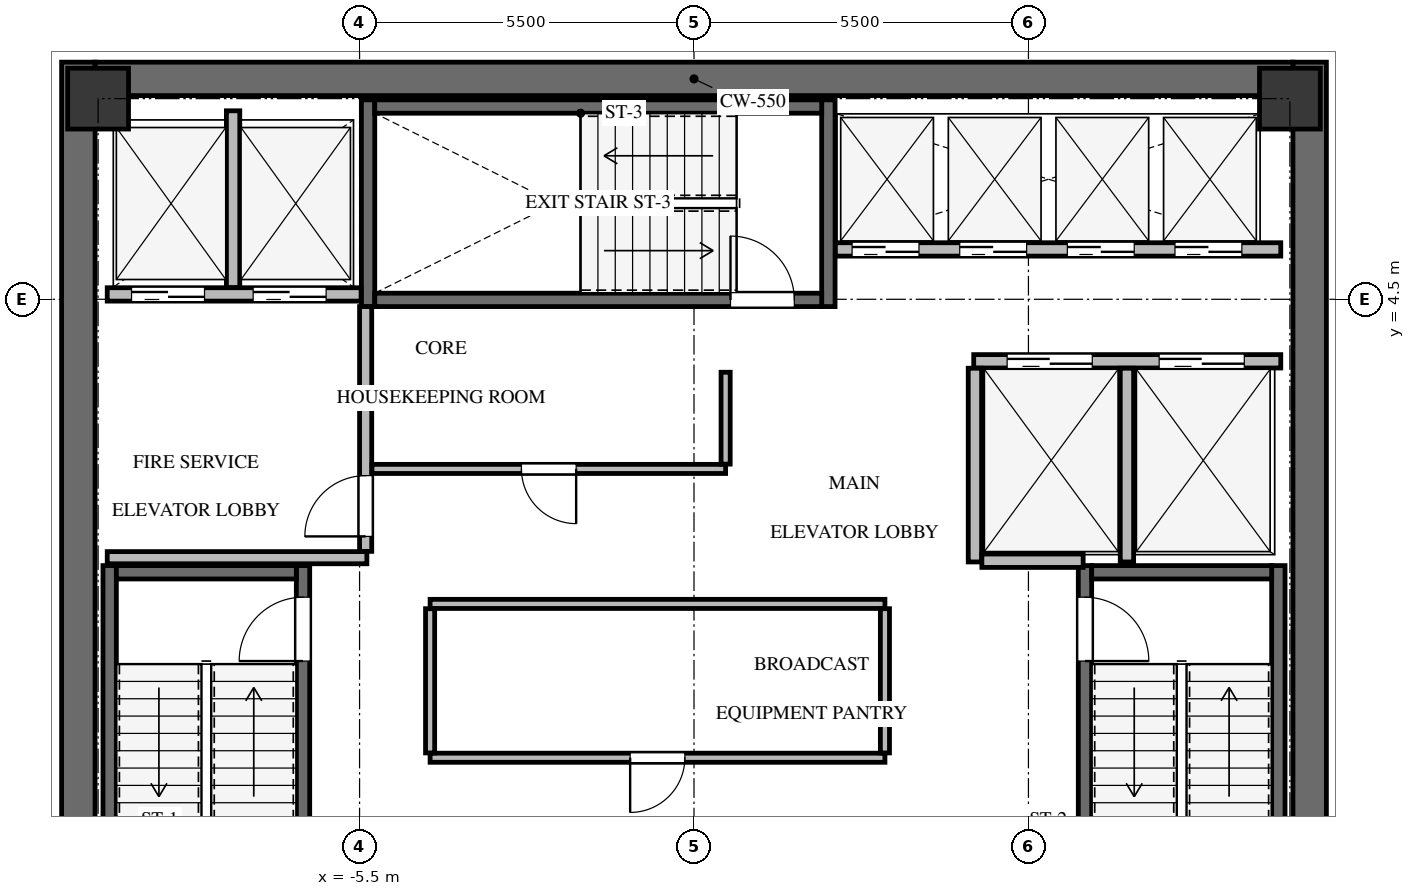
"""IFC4 building model, lengths in metres.
Left out: names, types, materials, properties, quantities, classifications, styles, units other than length and angle.
Written with IfcOpenShell. Run it as: python <this file> out.ifc"""

import sys

from ifc_helpers import new_model, si_unit, direction, frame, frame_2d, origin, origin_2d, place, context, subcontext, project, spatial, rectangle, extrude, source, transform, mapped, element, fill, save


model = new_model("IFC4")
c1 = context("Model", 3, precision=1e-05, world=origin(), true_north=direction((0.0, 1.0)))
c2 = subcontext(c1, "Body", "Model", "MODEL_VIEW")
j1 = project(units=[si_unit("LENGTHUNIT", "METRE"), si_unit("PLANEANGLEUNIT", "RADIAN")], contexts=[c1])
p1 = place(None, origin())
s1 = spatial("IfcSite", under=j1, at=p1, CompositionType="ELEMENT")
p2 = place(p1, origin())
s2 = spatial("IfcBuilding", under=s1, at=p2, CompositionType="ELEMENT")
p3 = place(p2, frame((0.0, 0.0, 251.3)))
s3 = spatial("IfcBuildingStorey", under=s2, at=p3, CompositionType="ELEMENT", Elevation=251.3)
for number, where, z_axis, x_axis in (
    (1, (-10.125, -8.4, 0.0), (0.0, 0.0, 1.0), (0.0, 1.0, 0.0)),
    (2, (10.125, -8.4, 0.0), (0.0, 0.0, 1.0), (0.0, 1.0, 0.0)),
):
    element("IfcWall", number, at=place(p3, frame(where, z_axis=z_axis, x_axis=x_axis)), inside=s3, PredefinedType="SHEAR", context=c2, shape_type="SweptSolid", body=[
        extrude(rectangle(XDim=16.8, YDim=0.55, at=frame_2d((8.4, 0.0))), origin(), (0.0, 0.0, 1.0), 3.4),
    ])
p4 = place(p3, frame((-9.85, 8.125, 0.0), z_axis=(0.0, 0.0, 1.0), x_axis=(1.0, 0.0, 0.0)))
e3 = element("IfcWall", 3, at=p4, inside=s3, PredefinedType="SHEAR", context=c2, shape_type="SweptSolid", body=[
    extrude(rectangle(XDim=19.7, YDim=0.55, at=frame_2d((9.85, 0.0))), origin(), (0.0, 0.0, 1.0), 3.4),
])
p5 = place(p3, frame((-6.43, -7.77, -0.24), z_axis=(0.0, 0.0, 1.0), x_axis=(0.0, 1.0, 0.0)))
e4 = element("IfcWall", 4, at=p5, inside=s3, PredefinedType="SHEAR", context=c2, shape_type="SweptSolid", body=[
    extrude(rectangle(XDim=7.89, YDim=0.22, at=frame_2d((3.945, 0.0))), origin(), (0.0, 0.0, 1.0), 3.4),
])
p6 = place(p5, frame((6.32, 0.0, 0.0)))
e5 = element("IfcOpeningElement", 5, at=p6, cuts=e4, PredefinedType="OPENING", context=c2, shape_type="SweptSolid", body=[
    extrude(rectangle(XDim=1.05, YDim=2.15, at=frame_2d((0.525, 1.075))), frame((0.0, 0.12, 0.0), z_axis=(0.0, -1.0, 0.0), x_axis=(1.0, 0.0, 0.0)), (0.0, 0.0, 1.0), 0.24),
])
p7 = place(p3, frame((-9.61, 0.12, -0.24), z_axis=(0.0, 0.0, 1.0), x_axis=(0.0, -1.0, 0.0)))
e6 = element("IfcWall", 6, at=p7, inside=s3, PredefinedType="SHEAR", context=c2, shape_type="SweptSolid", body=[
    extrude(rectangle(XDim=7.89, YDim=0.22, at=frame_2d((3.945, 0.0))), origin(), (0.0, 0.0, 1.0), 3.4),
])
p8 = place(p3, frame((-6.54, 0.01, -0.24), z_axis=(0.0, 0.0, 1.0), x_axis=(-1.0, 0.0, 0.0)))
e7 = element("IfcWall", 7, at=p8, inside=s3, PredefinedType="SHEAR", context=c2, shape_type="SweptSolid", body=[
    extrude(rectangle(XDim=2.96, YDim=0.22, at=frame_2d((1.48, 0.0))), origin(), (0.0, 0.0, 1.0), 3.4),
])
p9 = place(p3, frame((9.61, -7.77, -0.24), z_axis=(0.0, 0.0, 1.0), x_axis=(0.0, 1.0, 0.0)))
e8 = element("IfcWall", 8, at=p9, inside=s3, PredefinedType="SHEAR", context=c2, shape_type="SweptSolid", body=[
    extrude(rectangle(XDim=7.89, YDim=0.22, at=frame_2d((3.945, 0.0))), origin(), (0.0, 0.0, 1.0), 3.4),
])
p10 = place(p3, frame((6.43, 0.12, -0.24), z_axis=(0.0, 0.0, 1.0), x_axis=(0.0, -1.0, 0.0)))
e9 = element("IfcWall", 9, at=p10, inside=s3, PredefinedType="SHEAR", context=c2, shape_type="SweptSolid", body=[
    extrude(rectangle(XDim=7.89, YDim=0.22, at=frame_2d((3.945, 0.0))), origin(), (0.0, 0.0, 1.0), 3.4),
])
p11 = place(p10, frame((0.52, 0.0, 0.0)))
e10 = element("IfcOpeningElement", 10, at=p11, cuts=e9, PredefinedType="OPENING", context=c2, shape_type="SweptSolid", body=[
    extrude(rectangle(XDim=1.05, YDim=2.15, at=frame_2d((0.525, 1.075))), frame((0.0, 0.12, 0.0), z_axis=(0.0, -1.0, 0.0), x_axis=(1.0, 0.0, 0.0)), (0.0, 0.0, 1.0), 0.24),
])
p12 = place(p3, frame((9.5, 0.01, -0.24), z_axis=(0.0, 0.0, 1.0), x_axis=(-1.0, 0.0, 0.0)))
e11 = element("IfcWall", 11, at=p12, inside=s3, PredefinedType="SHEAR", context=c2, shape_type="SweptSolid", body=[
    extrude(rectangle(XDim=2.96, YDim=0.22, at=frame_2d((1.48, 0.0))), origin(), (0.0, 0.0, 1.0), 3.4),
])
for number, where, z_axis, x_axis in (
    (12, (2.21, 4.38, -0.24), (0.0, 0.0, 1.0), (0.0, 1.0, 0.0)),
    (13, (-5.36, 7.78, -0.24), (0.0, 0.0, 1.0), (0.0, -1.0, 0.0)),
):
    element("IfcWall", number, at=place(p3, frame(where, z_axis=z_axis, x_axis=x_axis)), inside=s3, PredefinedType="SHEAR", context=c2, shape_type="SweptSolid", body=[
        extrude(rectangle(XDim=3.4, YDim=0.22, at=frame_2d((1.7, 0.0))), origin(), (0.0, 0.0, 1.0), 3.4),
    ])
p13 = place(p3, frame((-5.25, 4.49, -0.24), z_axis=(0.0, 0.0, 1.0), x_axis=(1.0, 0.0, 0.0)))
e14 = element("IfcWall", 14, at=p13, inside=s3, PredefinedType="SHEAR", context=c2, shape_type="SweptSolid", body=[
    extrude(rectangle(XDim=7.35, YDim=0.22, at=frame_2d((3.675, 0.0))), origin(), (0.0, 0.0, 1.0), 3.4),
])
p14 = place(p13, frame((5.85, 0.0, 0.0)))
e15 = element("IfcOpeningElement", 15, at=p14, cuts=e14, PredefinedType="OPENING", context=c2, shape_type="SweptSolid", body=[
    extrude(rectangle(XDim=1.05, YDim=2.15, at=frame_2d((0.525, 1.075))), frame((0.0, 0.12, 0.0), z_axis=(0.0, -1.0, 0.0), x_axis=(1.0, 0.0, 0.0)), (0.0, 0.0, 1.0), 0.24),
])
p15 = place(p3, frame((2.1, 7.67, -0.24), z_axis=(0.0, 0.0, 1.0), x_axis=(-1.0, 0.0, 0.0)))
e16 = element("IfcWall", 16, at=p15, inside=s3, PredefinedType="SHEAR", context=c2, shape_type="SweptSolid", body=[
    extrude(rectangle(XDim=7.35, YDim=0.22, at=frame_2d((3.675, 0.0))), origin(), (0.0, 0.0, 1.0), 3.4),
])
m1 = source(origin(), c2, "Body", "SweptSolid", [
    extrude(rectangle(XDim=1.0, YDim=1.0, at=origin_2d()), origin(), (0.0, 0.0, 1.0), 3.4),
])
for number, where, z_axis, x_axis in (
    (17, (9.8, 7.8, -0.24), (0.0, 0.0, 1.0), (1.0, 0.0, 0.0)),
    (18, (-9.8, 7.8, -0.24), (0.0, 0.0, 1.0), (1.0, 0.0, 0.0)),
):
    element("IfcColumn", number, at=place(p3, frame(where, z_axis=z_axis, x_axis=x_axis)), inside=s3, PredefinedType="COLUMN", context=c2, shape_type="MappedRepresentation", body=[
        mapped(m1, transform((0.0, 0.0, 0.0), x_axis=(1.0, 0.0, 0.0), y_axis=(0.0, 1.0, 0.0), z_axis=(0.0, 0.0, 1.0), scale=1.0)),
    ])
p16 = place(p3, frame((-9.65, 4.58, 0.0), z_axis=(0.0, 0.0, 1.0), x_axis=(1.0, 0.0, 0.0)))
e19 = element("IfcWall", 19, at=p16, inside=s3, PredefinedType="SOLIDWALL", context=c2, shape_type="SweptSolid", body=[
    extrude(rectangle(XDim=4.175, YDim=0.22, at=frame_2d((2.087, 0.0))), origin(), (0.0, 0.0, 1.0), 3.145),
])
p17 = place(p16, frame((0.4, 0.0, 0.0)))
e20 = element("IfcOpeningElement", 20, at=p17, cuts=e19, PredefinedType="OPENING", context=c2, shape_type="SweptSolid", body=[
    extrude(rectangle(XDim=1.2, YDim=2.15, at=frame_2d((0.6, 1.075))), frame((0.0, 0.12, 0.0), z_axis=(0.0, -1.0, 0.0), x_axis=(1.0, 0.0, 0.0)), (0.0, 0.0, 1.0), 0.24),
])
p18 = place(p16, frame((2.4, 0.0, 0.0)))
e21 = element("IfcOpeningElement", 21, at=p18, cuts=e19, PredefinedType="OPENING", context=c2, shape_type="SweptSolid", body=[
    extrude(rectangle(XDim=1.2, YDim=2.15, at=frame_2d((0.6, 1.075))), frame((0.0, 0.12, 0.0), z_axis=(0.0, -1.0, 0.0), x_axis=(1.0, 0.0, 0.0)), (0.0, 0.0, 1.0), 0.24),
])
p19 = place(p3, frame((-7.58, 4.694, 0.0), z_axis=(0.0, 0.0, 1.0), x_axis=(0.0, 1.0, 0.0)))
e22 = element("IfcWall", 22, at=p19, inside=s3, PredefinedType="SOLIDWALL", context=c2, shape_type="SweptSolid", body=[
    extrude(rectangle(XDim=2.906, YDim=0.22, at=frame_2d((1.453, 0.0))), origin(), (0.0, 0.0, 1.0), 3.145),
])
p20 = place(p3, frame((-9.65, 0.25, 0.0), z_axis=(0.0, 0.0, 1.0), x_axis=(1.0, 0.0, 0.0)))
e23 = element("IfcWall", 23, at=p20, inside=s3, PredefinedType="SOLIDWALL", context=c2, shape_type="SweptSolid", body=[
    extrude(rectangle(XDim=4.27, YDim=0.2, at=frame_2d((2.135, 0.0))), origin(), (0.0, 0.0, 1.0), 3.145),
])
p21 = place(p3, frame((-5.4, 0.354, 0.0), z_axis=(0.0, 0.0, 1.0), x_axis=(0.0, 1.0, 0.0)))
e24 = element("IfcWall", 24, at=p21, inside=s3, PredefinedType="SOLIDWALL", context=c2, shape_type="SweptSolid", body=[
    extrude(rectangle(XDim=4.026, YDim=0.2, at=frame_2d((2.013, 0.0))), origin(), (0.0, 0.0, 1.0), 3.145),
])
p22 = place(p21, frame((0.246, 0.0, 0.0)))
e25 = element("IfcOpeningElement", 25, at=p22, cuts=e24, PredefinedType="OPENING", context=c2, shape_type="SweptSolid", body=[
    extrude(rectangle(XDim=1.0, YDim=2.15, at=frame_2d((0.5, 1.075))), frame((0.0, 0.11, 0.0), z_axis=(0.0, -1.0, 0.0), x_axis=(1.0, 0.0, 0.0)), (0.0, 0.0, 1.0), 0.22),
])
p23 = place(p3, frame((4.6, 3.48, 0.0), z_axis=(0.0, 0.0, 1.0), x_axis=(1.0, 0.0, 0.0)))
e26 = element("IfcWall", 26, at=p23, inside=s3, PredefinedType="SOLIDWALL", context=c2, shape_type="SweptSolid", body=[
    extrude(rectangle(XDim=5.05, YDim=0.22, at=frame_2d((2.525, 0.0))), origin(), (0.0, 0.0, 1.0), 3.145),
])
p24 = place(p23, frame((0.55, 0.0, 0.0)))
e27 = element("IfcOpeningElement", 27, at=p24, cuts=e26, PredefinedType="OPENING", context=c2, shape_type="SweptSolid", body=[
    extrude(rectangle(XDim=1.4, YDim=2.15, at=frame_2d((0.7, 1.075))), frame((0.0, 0.12, 0.0), z_axis=(0.0, -1.0, 0.0), x_axis=(1.0, 0.0, 0.0)), (0.0, 0.0, 1.0), 0.24),
])
p25 = place(p23, frame((3.05, 0.0, 0.0)))
e28 = element("IfcOpeningElement", 28, at=p25, cuts=e26, PredefinedType="OPENING", context=c2, shape_type="SweptSolid", body=[
    extrude(rectangle(XDim=1.4, YDim=2.15, at=frame_2d((0.7, 1.075))), frame((0.0, 0.12, 0.0), z_axis=(0.0, -1.0, 0.0), x_axis=(1.0, 0.0, 0.0)), (0.0, 0.0, 1.0), 0.24),
])
for number, where, z_axis, x_axis in (
    (29, (4.62, 0.18, 0.0), (0.0, 0.0, 1.0), (0.0, 1.0, 0.0)),
    (30, (7.12, 0.18, 0.0), (0.0, 0.0, 1.0), (0.0, 1.0, 0.0)),
):
    element("IfcWall", number, at=place(p3, frame(where, z_axis=z_axis, x_axis=x_axis)), inside=s3, PredefinedType="SOLIDWALL", context=c2, shape_type="SweptSolid", body=[
        extrude(rectangle(XDim=3.186, YDim=0.22, at=frame_2d((1.593, 0.0))), origin(), (0.0, 0.0, 1.0), 3.145),
    ])
p26 = place(p3, frame((4.734, 0.2, 0.0), z_axis=(0.0, 0.0, 1.0), x_axis=(1.0, 0.0, 0.0)))
e31 = element("IfcWall", 31, at=p26, inside=s3, PredefinedType="SOLIDWALL", context=c2, shape_type="SweptSolid", body=[
    extrude(rectangle(XDim=1.666, YDim=0.22, at=frame_2d((0.833, 0.0))), origin(), (0.0, 0.0, 1.0), 3.145),
])
p27 = place(p3, frame((2.325, 5.32, 0.0), z_axis=(0.0, 0.0, 1.0), x_axis=(1.0, 0.0, 0.0)))
e32 = element("IfcWall", 32, at=p27, inside=s3, PredefinedType="SOLIDWALL", context=c2, shape_type="SweptSolid", body=[
    extrude(rectangle(XDim=7.325, YDim=0.22, at=frame_2d((3.663, 0.0))), origin(), (0.0, 0.0, 1.0), 3.145),
])
p28 = place(p27, frame((0.275, 0.0, 0.0)))
e33 = element("IfcOpeningElement", 33, at=p28, cuts=e32, PredefinedType="OPENING", context=c2, shape_type="SweptSolid", body=[
    extrude(rectangle(XDim=1.1, YDim=2.15, at=frame_2d((0.55, 1.075))), frame((0.0, 0.12, 0.0), z_axis=(0.0, -1.0, 0.0), x_axis=(1.0, 0.0, 0.0)), (0.0, 0.0, 1.0), 0.24),
])
p29 = place(p27, frame((2.045, 0.0, 0.0)))
e34 = element("IfcOpeningElement", 34, at=p29, cuts=e32, PredefinedType="OPENING", context=c2, shape_type="SweptSolid", body=[
    extrude(rectangle(XDim=1.1, YDim=2.15, at=frame_2d((0.55, 1.075))), frame((0.0, 0.12, 0.0), z_axis=(0.0, -1.0, 0.0), x_axis=(1.0, 0.0, 0.0)), (0.0, 0.0, 1.0), 0.24),
])
p30 = place(p27, frame((3.815, 0.0, 0.0)))
e35 = element("IfcOpeningElement", 35, at=p30, cuts=e32, PredefinedType="OPENING", context=c2, shape_type="SweptSolid", body=[
    extrude(rectangle(XDim=1.1, YDim=2.15, at=frame_2d((0.55, 1.075))), frame((0.0, 0.12, 0.0), z_axis=(0.0, -1.0, 0.0), x_axis=(1.0, 0.0, 0.0)), (0.0, 0.0, 1.0), 0.24),
])
p31 = place(p27, frame((5.585, 0.0, 0.0)))
e36 = element("IfcOpeningElement", 36, at=p31, cuts=e32, PredefinedType="OPENING", context=c2, shape_type="SweptSolid", body=[
    extrude(rectangle(XDim=1.1, YDim=2.15, at=frame_2d((0.55, 1.075))), frame((0.0, 0.12, 0.0), z_axis=(0.0, -1.0, 0.0), x_axis=(1.0, 0.0, 0.0)), (0.0, 0.0, 1.0), 0.24),
])
p32 = place(p3, frame((3.14, -3.04, 0.0), z_axis=(0.0, 0.0, 1.0), x_axis=(-1.0, 0.0, 0.0)))
e37 = element("IfcWall", 37, at=p32, inside=s3, PredefinedType="PARTITIONING", context=c2, shape_type="SweptSolid", body=[
    extrude(rectangle(XDim=7.48, YDim=0.15, at=frame_2d((3.74, 0.0))), origin(), (0.0, 0.0, 1.0), 3.145),
])
p33 = place(p32, frame((3.29, 0.0, 0.0)))
e38 = element("IfcOpeningElement", 38, at=p33, cuts=e37, PredefinedType="OPENING", context=c2, shape_type="SweptSolid", body=[
    extrude(rectangle(XDim=0.9, YDim=2.05, at=frame_2d((0.45, 1.025))), frame((0.0, 0.085, 0.0), z_axis=(0.0, -1.0, 0.0), x_axis=(1.0, 0.0, 0.0)), (0.0, 0.0, 1.0), 0.17),
])
p34 = place(p3, frame((-4.34, -0.51, 0.0), z_axis=(0.0, 0.0, 1.0), x_axis=(1.0, 0.0, 0.0)))
e39 = element("IfcWall", 39, at=p34, inside=s3, PredefinedType="PARTITIONING", context=c2, shape_type="SweptSolid", body=[
    extrude(rectangle(XDim=7.48, YDim=0.15, at=frame_2d((3.74, 0.0))), origin(), (0.0, 0.0, 1.0), 3.145),
])
for number, where, z_axis, x_axis in (
    (40, (-4.34, -2.961, 0.0), (0.0, 0.0, 1.0), (0.0, 1.0, 0.0)),
    (41, (3.14, -0.589, 0.0), (0.0, 0.0, 1.0), (0.0, -1.0, 0.0)),
):
    element("IfcWall", number, at=place(p3, frame(where, z_axis=z_axis, x_axis=x_axis)), inside=s3, PredefinedType="PARTITIONING", context=c2, shape_type="SweptSolid", body=[
        extrude(rectangle(XDim=2.372, YDim=0.15, at=frame_2d((1.186, 0.0))), origin(), (0.0, 0.0, 1.0), 3.145),
    ])
p35 = place(p3, frame((0.52, 1.71, 0.0), z_axis=(0.0, 0.0, 1.0), x_axis=(-1.0, 0.0, 0.0)))
e42 = element("IfcWall", 42, at=p35, inside=s3, PredefinedType="PARTITIONING", context=c2, shape_type="SweptSolid", body=[
    extrude(rectangle(XDim=5.816, YDim=0.15, at=frame_2d((2.908, 0.0))), origin(), (0.0, 0.0, 1.0), 3.145),
])
p36 = place(p35, frame((2.458, 0.0, 0.0)))
e43 = element("IfcOpeningElement", 43, at=p36, cuts=e42, PredefinedType="OPENING", context=c2, shape_type="SweptSolid", body=[
    extrude(rectangle(XDim=0.9, YDim=2.05, at=frame_2d((0.45, 1.025))), frame((0.0, 0.085, 0.0), z_axis=(0.0, -1.0, 0.0), x_axis=(1.0, 0.0, 0.0)), (0.0, 0.0, 1.0), 0.17),
])
p37 = place(p3, frame((0.52, 3.3, 0.0), z_axis=(0.0, 0.0, 1.0), x_axis=(0.0, -1.0, 0.0)))
e44 = element("IfcWall", 44, at=p37, inside=s3, PredefinedType="PARTITIONING", context=c2, shape_type="SweptSolid", body=[
    extrude(rectangle(XDim=1.511, YDim=0.15, at=frame_2d((0.755, 0.0))), origin(), (0.0, 0.0, 1.0), 3.145),
])
m2 = source(origin(), c2, "Body", "SweptSolid", [
    extrude(rectangle(XDim=1.05, YDim=2.15, at=frame_2d((0.525, 1.075))), frame((0.0, 0.025, 0.0), z_axis=(0.0, -1.0, 0.0), x_axis=(1.0, 0.0, 0.0)), (0.0, 0.0, 1.0), 0.05),
])
p38 = place(p6, origin())
e45 = element("IfcDoor", 45, at=p38, inside=s3, OperationType="SINGLE_SWING_LEFT", PredefinedType="DOOR", context=c2, shape_type="MappedRepresentation", body=[
    mapped(m2, transform((0.0, 0.0, 0.0), x_axis=(1.0, 0.0, 0.0), y_axis=(0.0, 1.0, 0.0), z_axis=(0.0, 0.0, 1.0), scale=1.0)),
])
fill(e5, e45)
m3 = source(origin(), c2, "Body", "SweptSolid", [
    extrude(rectangle(XDim=1.05, YDim=2.15, at=frame_2d((0.525, 1.075))), frame((0.0, 0.025, 0.0), z_axis=(0.0, -1.0, 0.0), x_axis=(1.0, 0.0, 0.0)), (0.0, 0.0, 1.0), 0.05),
])
p39 = place(p11, origin())
e46 = element("IfcDoor", 46, at=p39, inside=s3, OperationType="SINGLE_SWING_RIGHT", PredefinedType="DOOR", context=c2, shape_type="MappedRepresentation", body=[
    mapped(m3, transform((0.0, 0.0, 0.0), x_axis=(1.0, 0.0, 0.0), y_axis=(0.0, 1.0, 0.0), z_axis=(0.0, 0.0, 1.0), scale=1.0)),
])
fill(e10, e46)
p40 = place(p14, origin())
e47 = element("IfcDoor", 47, at=p40, inside=s3, OperationType="SINGLE_SWING_LEFT", PredefinedType="DOOR", context=c2, shape_type="MappedRepresentation", body=[
    mapped(m2, transform((0.0, 0.0, 0.0), x_axis=(1.0, 0.0, 0.0), y_axis=(0.0, 1.0, 0.0), z_axis=(0.0, 0.0, 1.0), scale=1.0)),
])
fill(e15, e47)
m4 = source(origin(), c2, "Body", "SweptSolid", [
    extrude(rectangle(XDim=1.2, YDim=2.15, at=frame_2d((0.6, 1.075))), frame((0.0, 0.025, 0.0), z_axis=(0.0, -1.0, 0.0), x_axis=(1.0, 0.0, 0.0)), (0.0, 0.0, 1.0), 0.05),
])
p41 = place(p17, origin())
e48 = element("IfcDoor", 48, at=p41, inside=s3, OperationType="DOUBLE_DOOR_SLIDING", PredefinedType="DOOR", context=c2, shape_type="MappedRepresentation", body=[
    mapped(m4, transform((0.0, 0.0, 0.0), x_axis=(1.0, 0.0, 0.0), y_axis=(0.0, 1.0, 0.0), z_axis=(0.0, 0.0, 1.0), scale=1.0)),
])
fill(e20, e48)
p42 = place(p18, origin())
e49 = element("IfcDoor", 49, at=p42, inside=s3, OperationType="DOUBLE_DOOR_SLIDING", PredefinedType="DOOR", context=c2, shape_type="MappedRepresentation", body=[
    mapped(m4, transform((0.0, 0.0, 0.0), x_axis=(1.0, 0.0, 0.0), y_axis=(0.0, 1.0, 0.0), z_axis=(0.0, 0.0, 1.0), scale=1.0)),
])
fill(e21, e49)
m5 = source(origin(), c2, "Body", "SweptSolid", [
    extrude(rectangle(XDim=1.0, YDim=2.15, at=frame_2d((0.5, 1.075))), frame((0.0, 0.025, 0.0), z_axis=(0.0, -1.0, 0.0), x_axis=(1.0, 0.0, 0.0)), (0.0, 0.0, 1.0), 0.05),
])
p43 = place(p22, origin())
e50 = element("IfcDoor", 50, at=p43, inside=s3, OperationType="SINGLE_SWING_LEFT", PredefinedType="DOOR", context=c2, shape_type="MappedRepresentation", body=[
    mapped(m5, transform((0.0, 0.0, 0.0), x_axis=(1.0, 0.0, 0.0), y_axis=(0.0, 1.0, 0.0), z_axis=(0.0, 0.0, 1.0), scale=1.0)),
])
fill(e25, e50)
m6 = source(origin(), c2, "Body", "SweptSolid", [
    extrude(rectangle(XDim=1.4, YDim=2.15, at=frame_2d((0.7, 1.075))), frame((0.0, 0.025, 0.0), z_axis=(0.0, -1.0, 0.0), x_axis=(1.0, 0.0, 0.0)), (0.0, 0.0, 1.0), 0.05),
])
p44 = place(p24, origin())
e51 = element("IfcDoor", 51, at=p44, inside=s3, OperationType="DOUBLE_DOOR_SLIDING", PredefinedType="DOOR", context=c2, shape_type="MappedRepresentation", body=[
    mapped(m6, transform((0.0, 0.0, 0.0), x_axis=(1.0, 0.0, 0.0), y_axis=(0.0, 1.0, 0.0), z_axis=(0.0, 0.0, 1.0), scale=1.0)),
])
fill(e27, e51)
p45 = place(p25, origin())
e52 = element("IfcDoor", 52, at=p45, inside=s3, OperationType="DOUBLE_DOOR_SLIDING", PredefinedType="DOOR", context=c2, shape_type="MappedRepresentation", body=[
    mapped(m6, transform((0.0, 0.0, 0.0), x_axis=(1.0, 0.0, 0.0), y_axis=(0.0, 1.0, 0.0), z_axis=(0.0, 0.0, 1.0), scale=1.0)),
])
fill(e28, e52)
m7 = source(origin(), c2, "Body", "SweptSolid", [
    extrude(rectangle(XDim=1.1, YDim=2.15, at=frame_2d((0.55, 1.075))), frame((0.0, 0.025, 0.0), z_axis=(0.0, -1.0, 0.0), x_axis=(1.0, 0.0, 0.0)), (0.0, 0.0, 1.0), 0.05),
])
p46 = place(p28, origin())
e53 = element("IfcDoor", 53, at=p46, inside=s3, OperationType="DOUBLE_DOOR_SLIDING", PredefinedType="DOOR", context=c2, shape_type="MappedRepresentation", body=[
    mapped(m7, transform((0.0, 0.0, 0.0), x_axis=(1.0, 0.0, 0.0), y_axis=(0.0, 1.0, 0.0), z_axis=(0.0, 0.0, 1.0), scale=1.0)),
])
fill(e33, e53)
p47 = place(p29, origin())
e54 = element("IfcDoor", 54, at=p47, inside=s3, OperationType="DOUBLE_DOOR_SLIDING", PredefinedType="DOOR", context=c2, shape_type="MappedRepresentation", body=[
    mapped(m7, transform((0.0, 0.0, 0.0), x_axis=(1.0, 0.0, 0.0), y_axis=(0.0, 1.0, 0.0), z_axis=(0.0, 0.0, 1.0), scale=1.0)),
])
fill(e34, e54)
p48 = place(p30, origin())
e55 = element("IfcDoor", 55, at=p48, inside=s3, OperationType="DOUBLE_DOOR_SLIDING", PredefinedType="DOOR", context=c2, shape_type="MappedRepresentation", body=[
    mapped(m7, transform((0.0, 0.0, 0.0), x_axis=(1.0, 0.0, 0.0), y_axis=(0.0, 1.0, 0.0), z_axis=(0.0, 0.0, 1.0), scale=1.0)),
])
fill(e35, e55)
p49 = place(p31, origin())
e56 = element("IfcDoor", 56, at=p49, inside=s3, OperationType="DOUBLE_DOOR_SLIDING", PredefinedType="DOOR", context=c2, shape_type="MappedRepresentation", body=[
    mapped(m7, transform((0.0, 0.0, 0.0), x_axis=(1.0, 0.0, 0.0), y_axis=(0.0, 1.0, 0.0), z_axis=(0.0, 0.0, 1.0), scale=1.0)),
])
fill(e36, e56)
m8 = source(origin(), c2, "Body", "SweptSolid", [
    extrude(rectangle(XDim=0.9, YDim=2.05, at=frame_2d((0.45, 1.025))), frame((0.0, 0.025, 0.0), z_axis=(0.0, -1.0, 0.0), x_axis=(1.0, 0.0, 0.0)), (0.0, 0.0, 1.0), 0.05),
])
p50 = place(p33, origin())
e57 = element("IfcDoor", 57, at=p50, inside=s3, OperationType="SINGLE_SWING_RIGHT", PredefinedType="DOOR", context=c2, shape_type="MappedRepresentation", body=[
    mapped(m8, transform((0.0, 0.0, 0.0), x_axis=(1.0, 0.0, 0.0), y_axis=(0.0, 1.0, 0.0), z_axis=(0.0, 0.0, 1.0), scale=1.0)),
])
fill(e38, e57)
m9 = source(origin(), c2, "Body", "SweptSolid", [
    extrude(rectangle(XDim=0.9, YDim=2.05, at=frame_2d((0.45, 1.025))), frame((0.0, 0.025, 0.0), z_axis=(0.0, -1.0, 0.0), x_axis=(1.0, 0.0, 0.0)), (0.0, 0.0, 1.0), 0.05),
])
p51 = place(p36, origin())
e58 = element("IfcDoor", 58, at=p51, inside=s3, OperationType="SINGLE_SWING_LEFT", PredefinedType="DOOR", context=c2, shape_type="MappedRepresentation", body=[
    mapped(m9, transform((0.0, 0.0, 0.0), x_axis=(1.0, 0.0, 0.0), y_axis=(0.0, 1.0, 0.0), z_axis=(0.0, 0.0, 1.0), scale=1.0)),
])
fill(e43, e58)
save(model, sys.argv[1])
